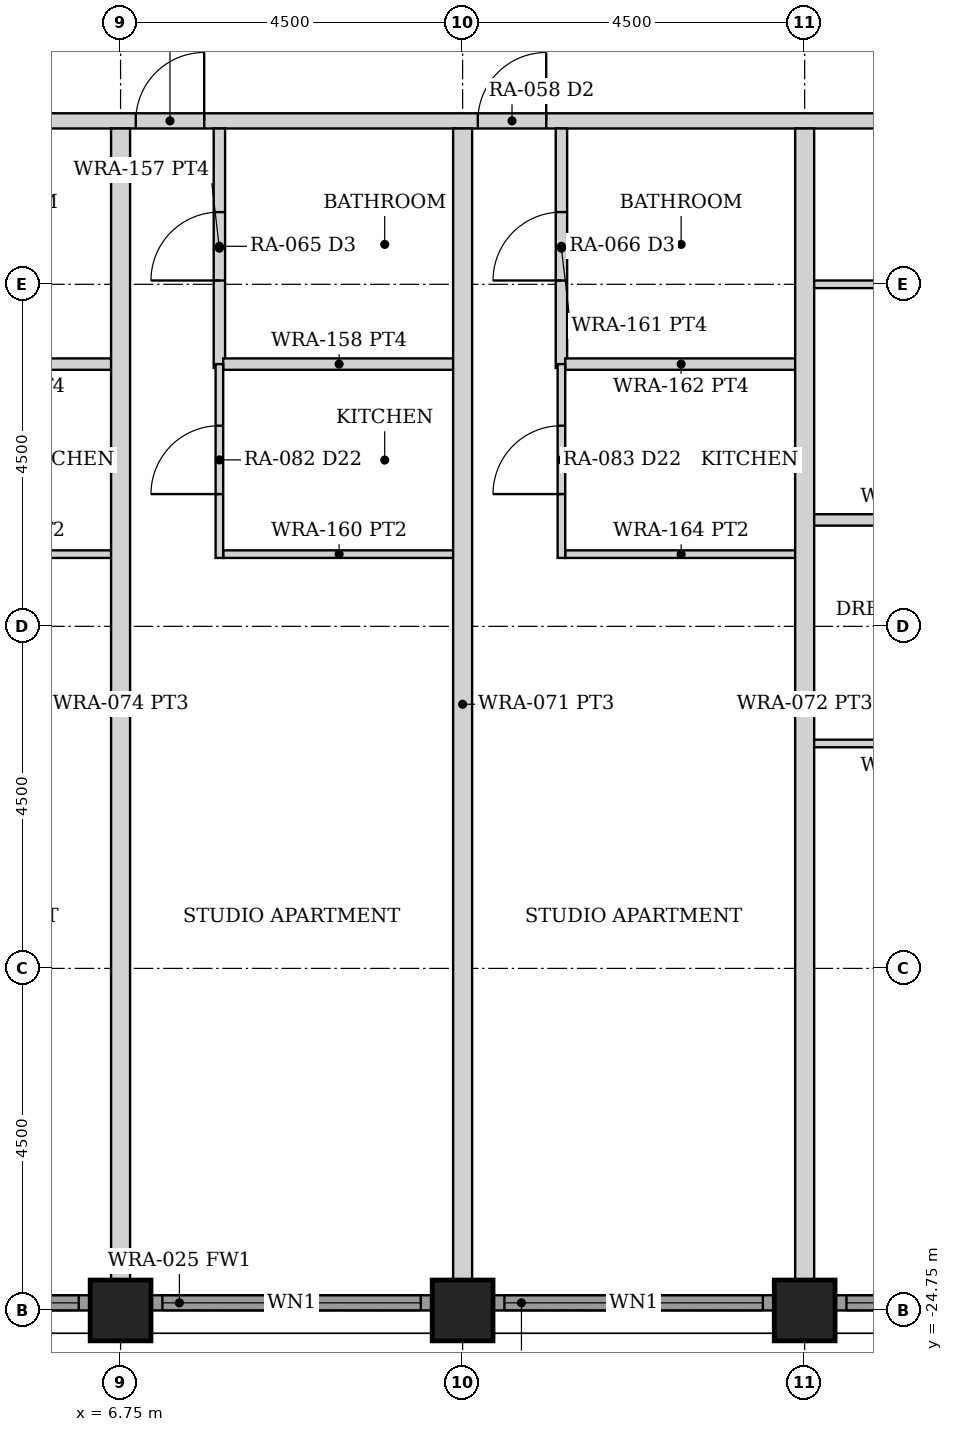
"""IFC4 building model, lengths in metres.
Left out: names, types, materials, properties, quantities, classifications, styles, units other than length and angle.
Written with IfcOpenShell. Run it as: python <this file> out.ifc"""

import sys

from ifc_helpers import new_model, si_unit, direction, frame, frame_2d, origin, origin_2d, place, context, subcontext, project, spatial, rectangle, hollow_rectangle, extrude, element, fill, save


model = new_model("IFC4")
c1 = context("Model", 3, precision=1e-05, world=origin(), true_north=direction((0.0, 1.0)))
c2 = subcontext(c1, "Body", "Model", "MODEL_VIEW")
j1 = project(units=[si_unit("LENGTHUNIT", "METRE"), si_unit("PLANEANGLEUNIT", "RADIAN")], contexts=[c1])
p1 = place(None, origin())
s1 = spatial("IfcSite", under=j1, at=p1, CompositionType="ELEMENT")
p2 = place(p1, origin())
s2 = spatial("IfcBuilding", under=s1, at=p2, CompositionType="ELEMENT")
p3 = place(p2, frame((0.0, 0.0, 26.5)))
s3 = spatial("IfcBuildingStorey", under=s2, at=p3, CompositionType="ELEMENT", Elevation=26.5)
for number, where, z_axis, x_axis in (
    (1, (6.75, -24.75, 0.0), (0.0, 0.0, 1.0), (0.0, 1.0, 0.0)),
    (2, (11.25, -24.75, 0.0), (0.0, 0.0, 1.0), (0.0, 1.0, 0.0)),
    (3, (15.75, -24.75, 0.0), (0.0, 0.0, 1.0), (0.0, 1.0, 0.0)),
):
    element("IfcColumn", number, at=place(p3, frame(where, z_axis=z_axis, x_axis=x_axis)), inside=s3, PredefinedType="COLUMN", context=c2, shape_type="SweptSolid", body=[
        extrude(hollow_rectangle(XDim=0.8, YDim=0.8, WallThickness=0.08, at=origin_2d()), origin(), (0.0, 0.0, 1.0), 3.5),
    ])
p4 = place(p3, frame((2.655, -24.65, 0.0), z_axis=(0.0, 0.0, 1.0), x_axis=(1.0, 0.0, 0.0)))
e4 = element("IfcWall", 4, at=p4, inside=s3, PredefinedType="SOLIDWALL", context=c2, shape_type="SweptSolid", body=[
    extrude(rectangle(XDim=3.69, YDim=0.2, at=frame_2d((1.845, 0.0))), origin(), (0.0, 0.0, 1.0), 2.379),
])
p5 = place(p4, frame((0.145, 0.0, 0.3)))
e5 = element("IfcOpeningElement", 5, at=p5, cuts=e4, PredefinedType="OPENING", context=c2, shape_type="SweptSolid", body=[
    extrude(rectangle(XDim=3.4, YDim=1.929, at=frame_2d((1.7, 0.964))), frame((0.0, 0.11, 0.0), z_axis=(0.0, -1.0, 0.0), x_axis=(1.0, 0.0, 0.0)), (0.0, 0.0, 1.0), 0.22),
])
p6 = place(p3, frame((7.155, -24.65, 0.0), z_axis=(0.0, 0.0, 1.0), x_axis=(1.0, 0.0, 0.0)))
e6 = element("IfcWall", 6, at=p6, inside=s3, PredefinedType="SOLIDWALL", context=c2, shape_type="SweptSolid", body=[
    extrude(rectangle(XDim=3.69, YDim=0.2, at=frame_2d((1.845, 0.0))), origin(), (0.0, 0.0, 1.0), 2.379),
])
p7 = place(p6, frame((0.145, 0.0, 0.3)))
e7 = element("IfcOpeningElement", 7, at=p7, cuts=e6, PredefinedType="OPENING", context=c2, shape_type="SweptSolid", body=[
    extrude(rectangle(XDim=3.4, YDim=1.929, at=frame_2d((1.7, 0.964))), frame((0.0, 0.11, 0.0), z_axis=(0.0, -1.0, 0.0), x_axis=(1.0, 0.0, 0.0)), (0.0, 0.0, 1.0), 0.22),
])
p8 = place(p3, frame((11.655, -24.65, 0.0), z_axis=(0.0, 0.0, 1.0), x_axis=(1.0, 0.0, 0.0)))
e8 = element("IfcWall", 8, at=p8, inside=s3, PredefinedType="SOLIDWALL", context=c2, shape_type="SweptSolid", body=[
    extrude(rectangle(XDim=3.69, YDim=0.2, at=frame_2d((1.845, 0.0))), origin(), (0.0, 0.0, 1.0), 2.379),
])
p9 = place(p8, frame((0.145, 0.0, 0.3)))
e9 = element("IfcOpeningElement", 9, at=p9, cuts=e8, PredefinedType="OPENING", context=c2, shape_type="SweptSolid", body=[
    extrude(rectangle(XDim=3.4, YDim=1.929, at=frame_2d((1.7, 0.964))), frame((0.0, 0.11, 0.0), z_axis=(0.0, -1.0, 0.0), x_axis=(1.0, 0.0, 0.0)), (0.0, 0.0, 1.0), 0.22),
])
p10 = place(p3, frame((16.155, -24.65, 0.0), z_axis=(0.0, 0.0, 1.0), x_axis=(1.0, 0.0, 0.0)))
e10 = element("IfcWall", 10, at=p10, inside=s3, PredefinedType="SOLIDWALL", context=c2, shape_type="SweptSolid", body=[
    extrude(rectangle(XDim=3.69, YDim=0.2, at=frame_2d((1.845, 0.0))), origin(), (0.0, 0.0, 1.0), 2.379),
])
p11 = place(p10, frame((0.145, 0.0, 0.3)))
e11 = element("IfcOpeningElement", 11, at=p11, cuts=e10, PredefinedType="OPENING", context=c2, shape_type="SweptSolid", body=[
    extrude(rectangle(XDim=3.4, YDim=1.929, at=frame_2d((1.7, 0.964))), frame((0.0, 0.11, 0.0), z_axis=(0.0, -1.0, 0.0), x_axis=(1.0, 0.0, 0.0)), (0.0, 0.0, 1.0), 0.22),
])
p12 = place(p3, frame((-24.55, -9.1, 0.0), z_axis=(0.0, 0.0, 1.0), x_axis=(1.0, 0.0, 0.0)))
e12 = element("IfcWall", 12, at=p12, inside=s3, PredefinedType="PARTITIONING", context=c2, shape_type="SweptSolid", body=[
    extrude(rectangle(XDim=49.1, YDim=0.2, at=frame_2d((24.55, 0.0))), origin(), (0.0, 0.0, 1.0), 2.373),
])
p13 = place(p12, frame((5.1, 0.0, 0.0)))
e13 = element("IfcOpeningElement", 13, at=p13, cuts=e12, PredefinedType="OPENING", context=c2, shape_type="SweptSolid", body=[
    extrude(rectangle(XDim=0.9, YDim=2.1, at=frame_2d((0.45, 1.05))), frame((0.0, 0.11, 0.0), z_axis=(0.0, -1.0, 0.0), x_axis=(1.0, 0.0, 0.0)), (0.0, 0.0, 1.0), 0.22),
])
p14 = place(p12, frame((9.0, 0.0, 0.0)))
e14 = element("IfcOpeningElement", 14, at=p14, cuts=e12, PredefinedType="OPENING", context=c2, shape_type="SweptSolid", body=[
    extrude(rectangle(XDim=0.9, YDim=2.1, at=frame_2d((0.45, 1.05))), frame((0.0, 0.11, 0.0), z_axis=(0.0, -1.0, 0.0), x_axis=(1.0, 0.0, 0.0)), (0.0, 0.0, 1.0), 0.22),
])
p15 = place(p12, frame((13.5, 0.0, 0.0)))
e15 = element("IfcOpeningElement", 15, at=p15, cuts=e12, PredefinedType="OPENING", context=c2, shape_type="SweptSolid", body=[
    extrude(rectangle(XDim=0.9, YDim=2.1, at=frame_2d((0.45, 1.05))), frame((0.0, 0.11, 0.0), z_axis=(0.0, -1.0, 0.0), x_axis=(1.0, 0.0, 0.0)), (0.0, 0.0, 1.0), 0.22),
])
p16 = place(p12, frame((18.0, 0.0, 0.0)))
e16 = element("IfcOpeningElement", 16, at=p16, cuts=e12, PredefinedType="OPENING", context=c2, shape_type="SweptSolid", body=[
    extrude(rectangle(XDim=0.9, YDim=2.1, at=frame_2d((0.45, 1.05))), frame((0.0, 0.11, 0.0), z_axis=(0.0, -1.0, 0.0), x_axis=(1.0, 0.0, 0.0)), (0.0, 0.0, 1.0), 0.22),
])
p17 = place(p12, frame((22.5, 0.0, 0.0)))
e17 = element("IfcOpeningElement", 17, at=p17, cuts=e12, PredefinedType="OPENING", context=c2, shape_type="SweptSolid", body=[
    extrude(rectangle(XDim=0.9, YDim=2.1, at=frame_2d((0.45, 1.05))), frame((0.0, 0.11, 0.0), z_axis=(0.0, -1.0, 0.0), x_axis=(1.0, 0.0, 0.0)), (0.0, 0.0, 1.0), 0.22),
])
p18 = place(p12, frame((27.0, 0.0, 0.0)))
e18 = element("IfcOpeningElement", 18, at=p18, cuts=e12, PredefinedType="OPENING", context=c2, shape_type="SweptSolid", body=[
    extrude(rectangle(XDim=0.9, YDim=2.1, at=frame_2d((0.45, 1.05))), frame((0.0, 0.11, 0.0), z_axis=(0.0, -1.0, 0.0), x_axis=(1.0, 0.0, 0.0)), (0.0, 0.0, 1.0), 0.22),
])
p19 = place(p12, frame((31.5, 0.0, 0.0)))
e19 = element("IfcOpeningElement", 19, at=p19, cuts=e12, PredefinedType="OPENING", context=c2, shape_type="SweptSolid", body=[
    extrude(rectangle(XDim=0.9, YDim=2.1, at=frame_2d((0.45, 1.05))), frame((0.0, 0.11, 0.0), z_axis=(0.0, -1.0, 0.0), x_axis=(1.0, 0.0, 0.0)), (0.0, 0.0, 1.0), 0.22),
])
p20 = place(p12, frame((36.0, 0.0, 0.0)))
e20 = element("IfcOpeningElement", 20, at=p20, cuts=e12, PredefinedType="OPENING", context=c2, shape_type="SweptSolid", body=[
    extrude(rectangle(XDim=0.9, YDim=2.1, at=frame_2d((0.45, 1.05))), frame((0.0, 0.11, 0.0), z_axis=(0.0, -1.0, 0.0), x_axis=(1.0, 0.0, 0.0)), (0.0, 0.0, 1.0), 0.22),
])
p21 = place(p12, frame((43.1, 0.0, 0.0)))
e21 = element("IfcOpeningElement", 21, at=p21, cuts=e12, PredefinedType="OPENING", context=c2, shape_type="SweptSolid", body=[
    extrude(rectangle(XDim=0.9, YDim=2.1, at=frame_2d((0.45, 1.05))), frame((0.0, 0.11, 0.0), z_axis=(0.0, -1.0, 0.0), x_axis=(1.0, 0.0, 0.0)), (0.0, 0.0, 1.0), 0.22),
])
p22 = place(p3, frame((3.6, -12.3, 0.0), z_axis=(0.0, 0.0, 1.0), x_axis=(1.0, 0.0, 0.0)))
e22 = element("IfcWall", 22, at=p22, inside=s3, PredefinedType="PARTITIONING", context=c2, shape_type="SweptSolid", body=[
    extrude(rectangle(XDim=3.05, YDim=0.15, at=frame_2d((1.525, 0.0))), origin(), (0.0, 0.0, 1.0), 2.373),
])
p23 = place(p3, frame((3.6, -14.8, 0.0), z_axis=(0.0, 0.0, 1.0), x_axis=(1.0, 0.0, 0.0)))
e23 = element("IfcWall", 23, at=p23, inside=s3, PredefinedType="PARTITIONING", context=c2, shape_type="SweptSolid", body=[
    extrude(rectangle(XDim=3.05, YDim=0.1, at=frame_2d((1.525, 0.0))), origin(), (0.0, 0.0, 1.0), 2.373),
])
p24 = place(p3, frame((8.05, -12.35, 0.0), z_axis=(0.0, 0.0, 1.0), x_axis=(0.0, 1.0, 0.0)))
e24 = element("IfcWall", 24, at=p24, inside=s3, PredefinedType="PARTITIONING", context=c2, shape_type="SweptSolid", body=[
    extrude(rectangle(XDim=3.15, YDim=0.15, at=frame_2d((1.575, 0.0))), origin(), (0.0, 0.0, 1.0), 2.373),
])
p25 = place(p24, frame((1.15, 0.0, 0.0)))
e25 = element("IfcOpeningElement", 25, at=p25, cuts=e24, PredefinedType="OPENING", context=c2, shape_type="SweptSolid", body=[
    extrude(rectangle(XDim=0.9, YDim=2.1, at=frame_2d((0.45, 1.05))), frame((0.0, 0.085, 0.0), z_axis=(0.0, -1.0, 0.0), x_axis=(1.0, 0.0, 0.0)), (0.0, 0.0, 1.0), 0.17),
])
p26 = place(p3, frame((8.1, -12.3, 0.0), z_axis=(0.0, 0.0, 1.0), x_axis=(1.0, 0.0, 0.0)))
e26 = element("IfcWall", 26, at=p26, inside=s3, PredefinedType="PARTITIONING", context=c2, shape_type="SweptSolid", body=[
    extrude(rectangle(XDim=3.05, YDim=0.15, at=frame_2d((1.525, 0.0))), origin(), (0.0, 0.0, 1.0), 2.373),
])
p27 = place(p3, frame((8.1, -14.8, 0.0), z_axis=(0.0, 0.0, 1.0), x_axis=(1.0, 0.0, 0.0)))
e27 = element("IfcWall", 27, at=p27, inside=s3, PredefinedType="PARTITIONING", context=c2, shape_type="SweptSolid", body=[
    extrude(rectangle(XDim=3.05, YDim=0.1, at=frame_2d((1.525, 0.0))), origin(), (0.0, 0.0, 1.0), 2.373),
])
p28 = place(p3, frame((8.05, -14.85, 0.0), z_axis=(0.0, 0.0, 1.0), x_axis=(0.0, 1.0, 0.0)))
e28 = element("IfcWall", 28, at=p28, inside=s3, PredefinedType="PARTITIONING", context=c2, shape_type="SweptSolid", body=[
    extrude(rectangle(XDim=2.55, YDim=0.1, at=frame_2d((1.275, 0.0))), origin(), (0.0, 0.0, 1.0), 2.373),
])
p29 = place(p28, frame((0.84, 0.0, 0.0)))
e29 = element("IfcOpeningElement", 29, at=p29, cuts=e28, PredefinedType="OPENING", context=c2, shape_type="SweptSolid", body=[
    extrude(rectangle(XDim=0.9, YDim=2.1, at=frame_2d((0.45, 1.05))), frame((0.0, 0.06, 0.0), z_axis=(0.0, -1.0, 0.0), x_axis=(1.0, 0.0, 0.0)), (0.0, 0.0, 1.0), 0.12),
])
p30 = place(p3, frame((12.55, -12.35, 0.0), z_axis=(0.0, 0.0, 1.0), x_axis=(0.0, 1.0, 0.0)))
e30 = element("IfcWall", 30, at=p30, inside=s3, PredefinedType="PARTITIONING", context=c2, shape_type="SweptSolid", body=[
    extrude(rectangle(XDim=3.15, YDim=0.15, at=frame_2d((1.575, 0.0))), origin(), (0.0, 0.0, 1.0), 2.373),
])
p31 = place(p30, frame((1.15, 0.0, 0.0)))
e31 = element("IfcOpeningElement", 31, at=p31, cuts=e30, PredefinedType="OPENING", context=c2, shape_type="SweptSolid", body=[
    extrude(rectangle(XDim=0.9, YDim=2.1, at=frame_2d((0.45, 1.05))), frame((0.0, 0.085, 0.0), z_axis=(0.0, -1.0, 0.0), x_axis=(1.0, 0.0, 0.0)), (0.0, 0.0, 1.0), 0.17),
])
p32 = place(p3, frame((12.6, -12.3, 0.0), z_axis=(0.0, 0.0, 1.0), x_axis=(1.0, 0.0, 0.0)))
e32 = element("IfcWall", 32, at=p32, inside=s3, PredefinedType="PARTITIONING", context=c2, shape_type="SweptSolid", body=[
    extrude(rectangle(XDim=3.05, YDim=0.15, at=frame_2d((1.525, 0.0))), origin(), (0.0, 0.0, 1.0), 2.373),
])
p33 = place(p3, frame((12.6, -14.8, 0.0), z_axis=(0.0, 0.0, 1.0), x_axis=(1.0, 0.0, 0.0)))
e33 = element("IfcWall", 33, at=p33, inside=s3, PredefinedType="PARTITIONING", context=c2, shape_type="SweptSolid", body=[
    extrude(rectangle(XDim=3.05, YDim=0.1, at=frame_2d((1.525, 0.0))), origin(), (0.0, 0.0, 1.0), 2.373),
])
p34 = place(p3, frame((12.55, -14.85, 0.0), z_axis=(0.0, 0.0, 1.0), x_axis=(0.0, 1.0, 0.0)))
e34 = element("IfcWall", 34, at=p34, inside=s3, PredefinedType="PARTITIONING", context=c2, shape_type="SweptSolid", body=[
    extrude(rectangle(XDim=2.55, YDim=0.1, at=frame_2d((1.275, 0.0))), origin(), (0.0, 0.0, 1.0), 2.373),
])
p35 = place(p34, frame((0.84, 0.0, 0.0)))
e35 = element("IfcOpeningElement", 35, at=p35, cuts=e34, PredefinedType="OPENING", context=c2, shape_type="SweptSolid", body=[
    extrude(rectangle(XDim=0.9, YDim=2.1, at=frame_2d((0.45, 1.05))), frame((0.0, 0.06, 0.0), z_axis=(0.0, -1.0, 0.0), x_axis=(1.0, 0.0, 0.0)), (0.0, 0.0, 1.0), 0.12),
])
p36 = place(p3, frame((15.85, -11.25, 0.0), z_axis=(0.0, 0.0, 1.0), x_axis=(1.0, 0.0, 0.0)))
e36 = element("IfcWall", 36, at=p36, inside=s3, PredefinedType="PARTITIONING", context=c2, shape_type="SweptSolid", body=[
    extrude(rectangle(XDim=8.5, YDim=0.1, at=frame_2d((4.25, 0.0))), origin(), (0.0, 0.0, 1.0), 2.373),
])
p37 = place(p36, frame((5.225, 0.0, 0.0)))
e37 = element("IfcOpeningElement", 37, at=p37, cuts=e36, PredefinedType="OPENING", context=c2, shape_type="SweptSolid", body=[
    extrude(rectangle(XDim=0.9, YDim=2.1, at=frame_2d((0.45, 1.05))), frame((0.0, 0.06, 0.0), z_axis=(0.0, -1.0, 0.0), x_axis=(1.0, 0.0, 0.0)), (0.0, 0.0, 1.0), 0.12),
])
p38 = place(p36, frame((7.25, 0.0, 0.0)))
e38 = element("IfcOpeningElement", 38, at=p38, cuts=e36, PredefinedType="OPENING", context=c2, shape_type="SweptSolid", body=[
    extrude(rectangle(XDim=0.9, YDim=2.1, at=frame_2d((0.45, 1.05))), frame((0.0, 0.06, 0.0), z_axis=(0.0, -1.0, 0.0), x_axis=(1.0, 0.0, 0.0)), (0.0, 0.0, 1.0), 0.12),
])
p39 = place(p36, frame((3.325, 0.0, 0.0)))
e39 = element("IfcOpeningElement", 39, at=p39, cuts=e36, PredefinedType="OPENING", context=c2, shape_type="SweptSolid", body=[
    extrude(rectangle(XDim=0.85, YDim=2.1, at=frame_2d((0.425, 1.05))), frame((0.0, 0.06, 0.0), z_axis=(0.0, -1.0, 0.0), x_axis=(1.0, 0.0, 0.0)), (0.0, 0.0, 1.0), 0.12),
])
p40 = place(p36, frame((1.08, 0.0, 0.0)))
e40 = element("IfcOpeningElement", 40, at=p40, cuts=e36, PredefinedType="OPENING", context=c2, shape_type="SweptSolid", body=[
    extrude(rectangle(XDim=0.9, YDim=2.1, at=frame_2d((0.45, 1.05))), frame((0.0, 0.06, 0.0), z_axis=(0.0, -1.0, 0.0), x_axis=(1.0, 0.0, 0.0)), (0.0, 0.0, 1.0), 0.12),
])
p41 = place(p3, frame((15.81, -14.35, 0.0), z_axis=(0.0, 0.0, 1.0), x_axis=(1.0, 0.0, 0.0)))
e41 = element("IfcWall", 41, at=p41, inside=s3, PredefinedType="PARTITIONING", context=c2, shape_type="SweptSolid", body=[
    extrude(rectangle(XDim=3.14, YDim=0.15, at=frame_2d((1.57, 0.0))), origin(), (0.0, 0.0, 1.0), 2.373),
])
p42 = place(p3, frame((15.81, -17.291, 0.0), z_axis=(0.0, 0.0, 1.0), x_axis=(1.0, 0.0, 0.0)))
e42 = element("IfcWall", 42, at=p42, inside=s3, PredefinedType="PARTITIONING", context=c2, shape_type="SweptSolid", body=[
    extrude(rectangle(XDim=3.14, YDim=0.1, at=frame_2d((1.57, 0.0))), origin(), (0.0, 0.0, 1.0), 2.373),
])
for number, where, z_axis, x_axis in (
    (43, (6.75, -24.35, 0.0), (0.0, 0.0, 1.0), (0.0, 1.0, 0.0)),
    (44, (11.25, -24.35, 0.0), (0.0, 0.0, 1.0), (0.0, 1.0, 0.0)),
    (45, (15.75, -24.35, 0.0), (0.0, 0.0, 1.0), (0.0, 1.0, 0.0)),
):
    element("IfcWall", number, at=place(p3, frame(where, z_axis=z_axis, x_axis=x_axis)), inside=s3, PredefinedType="PARTITIONING", context=c2, shape_type="SweptSolid", body=[
        extrude(rectangle(XDim=15.15, YDim=0.25, at=frame_2d((7.575, 0.0))), origin(), (0.0, 0.0, 1.0), 2.373),
    ])
p43 = place(p5, origin())
e46 = element("IfcWindow", 46, at=p43, inside=s3, PartitioningType="SINGLE_PANEL", PredefinedType="WINDOW", context=c2, shape_type="SweptSolid", body=[
    extrude(rectangle(XDim=3.4, YDim=1.929, at=frame_2d((1.7, 0.964))), frame((0.0, 0.03, 0.0), z_axis=(0.0, -1.0, 0.0), x_axis=(1.0, 0.0, 0.0)), (0.0, 0.0, 1.0), 0.06),
])
fill(e5, e46)
p44 = place(p7, origin())
e47 = element("IfcWindow", 47, at=p44, inside=s3, PartitioningType="SINGLE_PANEL", PredefinedType="WINDOW", context=c2, shape_type="SweptSolid", body=[
    extrude(rectangle(XDim=3.4, YDim=1.929, at=frame_2d((1.7, 0.964))), frame((0.0, 0.03, 0.0), z_axis=(0.0, -1.0, 0.0), x_axis=(1.0, 0.0, 0.0)), (0.0, 0.0, 1.0), 0.06),
])
fill(e7, e47)
p45 = place(p9, origin())
e48 = element("IfcWindow", 48, at=p45, inside=s3, PartitioningType="SINGLE_PANEL", PredefinedType="WINDOW", context=c2, shape_type="SweptSolid", body=[
    extrude(rectangle(XDim=3.4, YDim=1.929, at=frame_2d((1.7, 0.964))), frame((0.0, 0.03, 0.0), z_axis=(0.0, -1.0, 0.0), x_axis=(1.0, 0.0, 0.0)), (0.0, 0.0, 1.0), 0.06),
])
fill(e9, e48)
p46 = place(p11, origin())
e49 = element("IfcWindow", 49, at=p46, inside=s3, PartitioningType="SINGLE_PANEL", PredefinedType="WINDOW", context=c2, shape_type="SweptSolid", body=[
    extrude(rectangle(XDim=3.4, YDim=1.929, at=frame_2d((1.7, 0.964))), frame((0.0, 0.03, 0.0), z_axis=(0.0, -1.0, 0.0), x_axis=(1.0, 0.0, 0.0)), (0.0, 0.0, 1.0), 0.06),
])
fill(e11, e49)
p47 = place(p19, origin())
e50 = element("IfcDoor", 50, at=p47, inside=s3, OperationType="SINGLE_SWING_RIGHT", PredefinedType="DOOR", context=c2, shape_type="SweptSolid", body=[
    extrude(rectangle(XDim=0.9, YDim=2.1, at=frame_2d((0.45, 1.05))), frame((0.0, 0.025, 0.0), z_axis=(0.0, -1.0, 0.0), x_axis=(1.0, 0.0, 0.0)), (0.0, 0.0, 1.0), 0.05),
])
fill(e19, e50)
p48 = place(p25, origin())
e51 = element("IfcDoor", 51, at=p48, inside=s3, OperationType="SINGLE_SWING_LEFT", PredefinedType="DOOR", context=c2, shape_type="SweptSolid", body=[
    extrude(rectangle(XDim=0.9, YDim=2.1, at=frame_2d((0.45, 1.05))), frame((0.0, 0.025, 0.0), z_axis=(0.0, -1.0, 0.0), x_axis=(1.0, 0.0, 0.0)), (0.0, 0.0, 1.0), 0.05),
])
fill(e25, e51)
p49 = place(p29, origin())
e52 = element("IfcDoor", 52, at=p49, inside=s3, OperationType="SINGLE_SWING_LEFT", PredefinedType="DOOR", context=c2, shape_type="SweptSolid", body=[
    extrude(rectangle(XDim=0.9, YDim=2.1, at=frame_2d((0.45, 1.05))), frame((0.0, 0.025, 0.0), z_axis=(0.0, -1.0, 0.0), x_axis=(1.0, 0.0, 0.0)), (0.0, 0.0, 1.0), 0.05),
])
fill(e29, e52)
p50 = place(p20, origin())
e53 = element("IfcDoor", 53, at=p50, inside=s3, OperationType="SINGLE_SWING_RIGHT", PredefinedType="DOOR", context=c2, shape_type="SweptSolid", body=[
    extrude(rectangle(XDim=0.9, YDim=2.1, at=frame_2d((0.45, 1.05))), frame((0.0, 0.025, 0.0), z_axis=(0.0, -1.0, 0.0), x_axis=(1.0, 0.0, 0.0)), (0.0, 0.0, 1.0), 0.05),
])
fill(e20, e53)
p51 = place(p31, origin())
e54 = element("IfcDoor", 54, at=p51, inside=s3, OperationType="SINGLE_SWING_LEFT", PredefinedType="DOOR", context=c2, shape_type="SweptSolid", body=[
    extrude(rectangle(XDim=0.9, YDim=2.1, at=frame_2d((0.45, 1.05))), frame((0.0, 0.025, 0.0), z_axis=(0.0, -1.0, 0.0), x_axis=(1.0, 0.0, 0.0)), (0.0, 0.0, 1.0), 0.05),
])
fill(e31, e54)
p52 = place(p35, origin())
e55 = element("IfcDoor", 55, at=p52, inside=s3, OperationType="SINGLE_SWING_LEFT", PredefinedType="DOOR", context=c2, shape_type="SweptSolid", body=[
    extrude(rectangle(XDim=0.9, YDim=2.1, at=frame_2d((0.45, 1.05))), frame((0.0, 0.025, 0.0), z_axis=(0.0, -1.0, 0.0), x_axis=(1.0, 0.0, 0.0)), (0.0, 0.0, 1.0), 0.05),
])
fill(e35, e55)
save(model, sys.argv[1])
